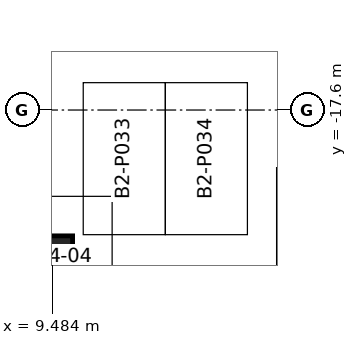
"""IFC4 building model, lengths in metres.
Left out: names, types, materials, properties, quantities, classifications, styles, units other than length and angle.
Written with IfcOpenShell. Run it as: python <this file> out.ifc"""

import sys

from ifc_helpers import new_model, si_unit, direction, frame, origin, origin_2d, place, context, subcontext, project, spatial, rectangle, extrude, element, save


model = new_model("IFC4")
c1 = context("Model", 3, precision=1e-05, world=origin(), true_north=direction((0.0, 1.0)))
c2 = subcontext(c1, "Body", "Model", "MODEL_VIEW")
j1 = project(units=[si_unit("LENGTHUNIT", "METRE"), si_unit("PLANEANGLEUNIT", "RADIAN")], contexts=[c1])
p1 = place(None, origin())
s1 = spatial("IfcSite", under=j1, at=p1, CompositionType="ELEMENT")
p2 = place(p1, origin())
s2 = spatial("IfcBuilding", under=s1, at=p2, CompositionType="ELEMENT")
p3 = place(p2, frame((0.0, 0.0, -9.0)))
s3 = spatial("IfcBuildingStorey", under=s2, at=p3, CompositionType="ELEMENT", Elevation=-9.0)
p4 = place(p3, frame((9.45, -22.439, 0.0), z_axis=(0.0, 0.0, 1.0), x_axis=(0.997839473817, 0.06569919705, 0.0)))
e1 = element("IfcColumn", 1, at=p4, inside=s3, PredefinedType="COLUMN", context=c2, shape_type="SweptSolid", body=[
    extrude(rectangle(XDim=1.4, YDim=1.4, at=origin_2d()), origin(), (0.0, 0.0, 1.0), 4.5),
])
save(model, sys.argv[1])
